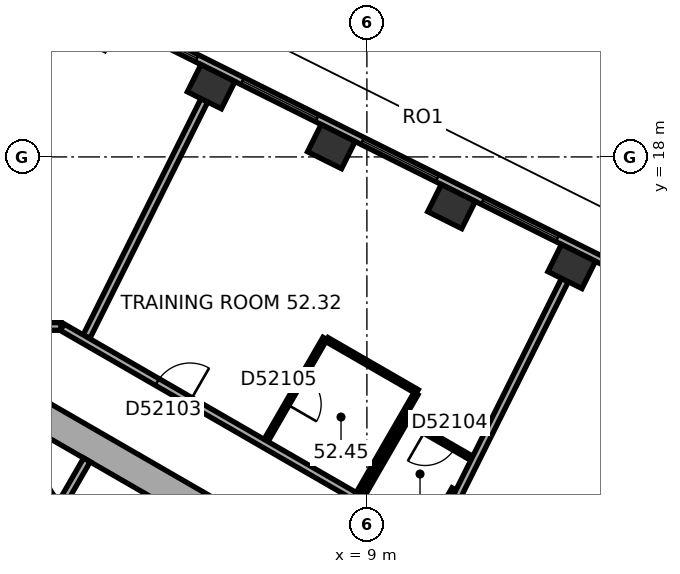
"""IFC4 building model, lengths in metres.
Left out: names, types, materials, properties, quantities, classifications, styles, units other than length and angle.
Written with IfcOpenShell. Run it as: python <this file> out.ifc"""

import sys

from ifc_helpers import new_model, si_unit, direction, frame, frame_2d, origin, origin_2d, place, context, subcontext, project, spatial, rectangle, extrude, element, fill, save


model = new_model("IFC4")
c1 = context("Model", 3, precision=1e-05, world=origin(), true_north=direction((0.0, 1.0)))
c2 = subcontext(c1, "Body", "Model", "MODEL_VIEW")
j1 = project(units=[si_unit("LENGTHUNIT", "METRE"), si_unit("PLANEANGLEUNIT", "RADIAN")], contexts=[c1])
p1 = place(None, origin())
s1 = spatial("IfcSite", under=j1, at=p1, CompositionType="ELEMENT")
p2 = place(p1, origin())
s2 = spatial("IfcBuilding", under=s1, at=p2, CompositionType="ELEMENT")
p3 = place(p2, frame((0.0, 0.0, 210.6)))
s3 = spatial("IfcBuildingStorey", under=s2, at=p3, CompositionType="ELEMENT", Elevation=210.6)
for number, where, z_axis, x_axis in (
    (1, (14.389, 15.118, 0.0), (0.0, 0.0, 1.0), (-0.895, 0.446, 0.0)),
    (2, (11.227, 16.695, 0.0), (0.0, 0.0, 1.0), (-0.895, 0.446, 0.0)),
    (3, (8.064, 18.271, 0.0), (0.0, 0.0, 1.0), (-0.895, 0.446, 0.0)),
    (4, (4.902, 19.848, 0.0), (0.0, 0.0, 1.0), (-0.895, 0.446, 0.0)),
):
    element("IfcColumn", number, at=place(p3, frame(where, z_axis=z_axis, x_axis=x_axis)), inside=s3, PredefinedType="COLUMN", context=c2, shape_type="SweptSolid", body=[
        extrude(rectangle(XDim=1.0, YDim=0.8, at=origin_2d()), origin(), (0.0, 0.0, 1.0), 3.7),
    ])
p4 = place(p3, frame((10.1, 5.6, 0.0), z_axis=(0.0, 0.0, 1.0), x_axis=(-0.866023897231, 0.500002609418, 0.0)))
e5 = element("IfcWall", 5, at=p4, inside=s3, PredefinedType="SHEAR", context=c2, shape_type="SweptSolid", body=[
    extrude(rectangle(XDim=11.894, YDim=0.8, at=frame_2d((5.947, 0.0))), origin(), (0.0, 0.0, 1.0), 3.7),
])
p5 = place(p4, frame((5.197, 0.0, 0.0)))
e6 = element("IfcOpeningElement", 6, at=p5, cuts=e5, PredefinedType="OPENING", context=c2, shape_type="SweptSolid", body=[
    extrude(rectangle(XDim=0.9, YDim=2.1, at=frame_2d((0.45, 1.05))), frame((0.0, 0.41, 0.0), z_axis=(0.0, -1.0, 0.0), x_axis=(1.0, 0.0, 0.0)), (0.0, 0.0, 1.0), 0.82),
])
p6 = place(p3, frame((18.299, 13.727, 0.0), z_axis=(0.0, 0.0, 1.0), x_axis=(-0.894934554817, 0.44619742558, 0.0)))
e7 = element("IfcWall", 7, at=p6, inside=s3, PredefinedType="STANDARD", context=c2, shape_type="SweptSolid", body=[
    extrude(rectangle(XDim=18.841, YDim=0.2, at=frame_2d((9.421, 0.0))), origin(), (0.0, 0.0, 1.0), 3.7),
])
p7 = place(p6, frame((1.253, 0.0, 0.9)))
e8 = element("IfcOpeningElement", 8, at=p7, cuts=e7, PredefinedType="OPENING", context=c2, shape_type="SweptSolid", body=[
    extrude(rectangle(XDim=2.2, YDim=2.0, at=frame_2d((1.1, 1.0))), frame((0.0, 0.11, 0.0), z_axis=(0.0, -1.0, 0.0), x_axis=(1.0, 0.0, 0.0)), (0.0, 0.0, 1.0), 0.22),
])
p8 = place(p6, frame((4.786, 0.0, 0.9)))
e9 = element("IfcOpeningElement", 9, at=p8, cuts=e7, PredefinedType="OPENING", context=c2, shape_type="SweptSolid", body=[
    extrude(rectangle(XDim=2.2, YDim=2.0, at=frame_2d((1.1, 1.0))), frame((0.0, 0.11, 0.0), z_axis=(0.0, -1.0, 0.0), x_axis=(1.0, 0.0, 0.0)), (0.0, 0.0, 1.0), 0.22),
])
p9 = place(p6, frame((8.32, 0.0, 0.9)))
e10 = element("IfcOpeningElement", 10, at=p9, cuts=e7, PredefinedType="OPENING", context=c2, shape_type="SweptSolid", body=[
    extrude(rectangle(XDim=2.2, YDim=2.0, at=frame_2d((1.1, 1.0))), frame((0.0, 0.11, 0.0), z_axis=(0.0, -1.0, 0.0), x_axis=(1.0, 0.0, 0.0)), (0.0, 0.0, 1.0), 0.22),
])
p10 = place(p6, frame((11.854, 0.0, 0.9)))
e11 = element("IfcOpeningElement", 11, at=p10, cuts=e7, PredefinedType="OPENING", context=c2, shape_type="SweptSolid", body=[
    extrude(rectangle(XDim=2.2, YDim=2.0, at=frame_2d((1.1, 1.0))), frame((0.0, 0.11, 0.0), z_axis=(0.0, -1.0, 0.0), x_axis=(1.0, 0.0, 0.0)), (0.0, 0.0, 1.0), 0.22),
])
p11 = place(p6, frame((15.387, 0.0, 0.9)))
e12 = element("IfcOpeningElement", 12, at=p11, cuts=e7, PredefinedType="OPENING", context=c2, shape_type="SweptSolid", body=[
    extrude(rectangle(XDim=2.2, YDim=2.0, at=frame_2d((1.1, 1.0))), frame((0.0, 0.11, 0.0), z_axis=(0.0, -1.0, 0.0), x_axis=(1.0, 0.0, 0.0)), (0.0, 0.0, 1.0), 0.22),
])
p12 = place(p3, frame((0.532, 8.122, 0.0), z_axis=(0.0, 0.0, 1.0), x_axis=(0.500077893725, 0.86598042715, 0.0)))
e13 = element("IfcWall", 13, at=p12, inside=s3, PredefinedType="PARTITIONING", context=c2, shape_type="SweptSolid", body=[
    extrude(rectangle(XDim=2.2, YDim=0.2, at=frame_2d((1.1, 0.0))), origin(), (0.0, 0.0, 1.0), 3.35),
])
p13 = place(p3, frame((0.767, 8.872, 0.0), z_axis=(0.0, 0.0, 1.0), x_axis=(-0.499994660107, 0.866028486751, 0.0)))
e14 = element("IfcWall", 14, at=p13, inside=s3, PredefinedType="PARTITIONING", context=c2, shape_type="SweptSolid", body=[
    extrude(rectangle(XDim=2.2, YDim=0.2, at=frame_2d((1.1, 0.0))), origin(), (0.0, 0.0, 1.0), 3.35),
])
p14 = place(p3, frame((0.95, 13.539, 0.0), z_axis=(0.0, 0.0, 1.0), x_axis=(-1.0, 0.0, 0.0)))
e15 = element("IfcWall", 15, at=p14, inside=s3, PredefinedType="PARTITIONING", context=c2, shape_type="SweptSolid", body=[
    extrude(rectangle(XDim=1.9, YDim=0.2, at=frame_2d((0.95, 0.0))), origin(), (0.0, 0.0, 1.0), 3.35),
])
p15 = place(p3, frame((4.723, 19.49, 0.0), z_axis=(0.0, 0.0, 1.0), x_axis=(-0.446186614574, -0.894939944898, 0.0)))
e16 = element("IfcWall", 16, at=p15, inside=s3, PredefinedType="PARTITIONING", context=c2, shape_type="SweptSolid", body=[
    extrude(rectangle(XDim=6.944, YDim=0.2, at=frame_2d((3.472, 0.0))), origin(), (0.0, 0.0, 1.0), 2.65),
])
p16 = place(p3, frame((6.347, 10.539, 0.0), z_axis=(0.0, 0.0, 1.0), x_axis=(0.499933790963, 0.866063626216, 0.0)))
e17 = element("IfcWall", 17, at=p16, inside=s3, PredefinedType="PARTITIONING", context=c2, shape_type="SweptSolid", body=[
    extrude(rectangle(XDim=3.1, YDim=0.12, at=frame_2d((1.55, 0.0))), origin(), (0.0, 0.0, 1.0), 3.35),
])
p17 = place(p16, frame((1.1, 0.0, 0.0)))
e18 = element("IfcOpeningElement", 18, at=p17, cuts=e17, PredefinedType="OPENING", context=c2, shape_type="SweptSolid", body=[
    extrude(rectangle(XDim=0.9, YDim=2.1, at=frame_2d((0.45, 1.05))), frame((0.0, 0.07, 0.0), z_axis=(0.0, -1.0, 0.0), x_axis=(1.0, 0.0, 0.0)), (0.0, 0.0, 1.0), 0.14),
])
p18 = place(p3, frame((7.948, 13.193, 0.0), z_axis=(0.0, 0.0, 1.0), x_axis=(0.866019409031, -0.500010383074, 0.0)))
e19 = element("IfcWall", 19, at=p18, inside=s3, PredefinedType="PARTITIONING", context=c2, shape_type="SweptSolid", body=[
    extrude(rectangle(XDim=2.74, YDim=0.12, at=frame_2d((1.37, 0.0))), origin(), (0.0, 0.0, 1.0), 3.35),
])
p19 = place(p3, frame((8.721, 9.052, 0.0), z_axis=(0.0, 0.0, 1.0), x_axis=(-0.866028125821, 0.499995285264, 0.0)))
e20 = element("IfcWall", 20, at=p19, inside=s3, PredefinedType="PARTITIONING", context=c2, shape_type="SweptSolid", body=[
    extrude(rectangle(XDim=8.934, YDim=0.2, at=frame_2d((4.467, 0.0))), origin(), (0.0, 0.0, 1.0), 3.35),
])
p20 = place(p19, frame((5.05, 0.0, 0.0)))
e21 = element("IfcOpeningElement", 21, at=p20, cuts=e20, PredefinedType="OPENING", context=c2, shape_type="SweptSolid", body=[
    extrude(rectangle(XDim=1.0, YDim=2.1, at=frame_2d((0.5, 1.05))), frame((0.0, 0.11, 0.0), z_axis=(0.0, -1.0, 0.0), x_axis=(1.0, 0.0, 0.0)), (0.0, 0.0, 1.0), 0.22),
])
p21 = place(p3, frame((8.875, 9.079, 0.0), z_axis=(0.0, 0.0, 1.0), x_axis=(0.499998129301, 0.86602648383, 0.0)))
e22 = element("IfcWall", 22, at=p21, inside=s3, PredefinedType="PARTITIONING", context=c2, shape_type="SweptSolid", body=[
    extrude(rectangle(XDim=2.3, YDim=0.12, at=frame_2d((1.15, 0.0))), origin(), (0.0, 0.0, 1.0), 3.35),
])
p22 = place(p3, frame((10.077, 11.04, 0.0), z_axis=(0.0, 0.0, 1.0), x_axis=(0.866043088465, -0.499969367985, 0.0)))
e23 = element("IfcWall", 23, at=p22, inside=s3, PredefinedType="PARTITIONING", context=c2, shape_type="SweptSolid", body=[
    extrude(rectangle(XDim=1.94, YDim=0.12, at=frame_2d((0.97, 0.0))), origin(), (0.0, 0.0, 1.0), 3.35),
])
p23 = place(p22, frame((0.52, 0.0, 0.0)))
e24 = element("IfcOpeningElement", 24, at=p23, cuts=e23, PredefinedType="OPENING", context=c2, shape_type="SweptSolid", body=[
    extrude(rectangle(XDim=0.9, YDim=2.1, at=frame_2d((0.45, 1.05))), frame((0.0, 0.07, 0.0), z_axis=(0.0, -1.0, 0.0), x_axis=(1.0, 0.0, 0.0)), (0.0, 0.0, 1.0), 0.14),
])
p24 = place(p3, frame((10.292, 11.771, 0.0), z_axis=(0.0, 0.0, 1.0), x_axis=(-0.500026023896, -0.86601037836, 0.0)))
e25 = element("IfcWall", 25, at=p24, inside=s3, PredefinedType="PARTITIONING", context=c2, shape_type="SweptSolid", body=[
    extrude(rectangle(XDim=3.04, YDim=0.12, at=frame_2d((1.52, 0.0))), origin(), (0.0, 0.0, 1.0), 3.35),
])
p25 = place(p3, frame((11.291, 9.263, 0.0), z_axis=(0.0, 0.0, 1.0), x_axis=(-0.500036664704, -0.866004234373, 0.0)))
e26 = element("IfcWall", 26, at=p25, inside=s3, PredefinedType="PARTITIONING", context=c2, shape_type="SweptSolid", body=[
    extrude(rectangle(XDim=1.368, YDim=0.12, at=frame_2d((0.684, 0.0))), origin(), (0.0, 0.0, 1.0), 3.35),
])
p26 = place(p3, frame((14.211, 14.76, 0.0), z_axis=(0.0, 0.0, 1.0), x_axis=(-0.446198490295, -0.89493402397, 0.0)))
e27 = element("IfcWall", 27, at=p26, inside=s3, PredefinedType="PARTITIONING", context=c2, shape_type="SweptSolid", body=[
    extrude(rectangle(XDim=7.602, YDim=0.2, at=frame_2d((3.801, 0.0))), origin(), (0.0, 0.0, 1.0), 3.35),
])
p27 = place(p8, origin())
e28 = element("IfcWindow", 28, at=p27, inside=s3, PartitioningType="SINGLE_PANEL", PredefinedType="WINDOW", context=c2, shape_type="SweptSolid", body=[
    extrude(rectangle(XDim=2.2, YDim=2.0, at=frame_2d((1.1, 1.0))), frame((0.0, 0.03, 0.0), z_axis=(0.0, -1.0, 0.0), x_axis=(1.0, 0.0, 0.0)), (0.0, 0.0, 1.0), 0.06),
])
fill(e9, e28)
p28 = place(p9, origin())
e29 = element("IfcWindow", 29, at=p28, inside=s3, PartitioningType="SINGLE_PANEL", PredefinedType="WINDOW", context=c2, shape_type="SweptSolid", body=[
    extrude(rectangle(XDim=2.2, YDim=2.0, at=frame_2d((1.1, 1.0))), frame((0.0, 0.03, 0.0), z_axis=(0.0, -1.0, 0.0), x_axis=(1.0, 0.0, 0.0)), (0.0, 0.0, 1.0), 0.06),
])
fill(e10, e29)
p29 = place(p10, origin())
e30 = element("IfcWindow", 30, at=p29, inside=s3, PartitioningType="SINGLE_PANEL", PredefinedType="WINDOW", context=c2, shape_type="SweptSolid", body=[
    extrude(rectangle(XDim=2.2, YDim=2.0, at=frame_2d((1.1, 1.0))), frame((0.0, 0.03, 0.0), z_axis=(0.0, -1.0, 0.0), x_axis=(1.0, 0.0, 0.0)), (0.0, 0.0, 1.0), 0.06),
])
fill(e11, e30)
p30 = place(p11, origin())
e31 = element("IfcWindow", 31, at=p30, inside=s3, PartitioningType="SINGLE_PANEL", PredefinedType="WINDOW", context=c2, shape_type="SweptSolid", body=[
    extrude(rectangle(XDim=2.2, YDim=2.0, at=frame_2d((1.1, 1.0))), frame((0.0, 0.03, 0.0), z_axis=(0.0, -1.0, 0.0), x_axis=(1.0, 0.0, 0.0)), (0.0, 0.0, 1.0), 0.06),
])
fill(e12, e31)
p31 = place(p20, origin())
e32 = element("IfcDoor", 32, at=p31, inside=s3, OperationType="SINGLE_SWING_LEFT", PredefinedType="DOOR", context=c2, shape_type="SweptSolid", body=[
    extrude(rectangle(XDim=1.0, YDim=2.1, at=frame_2d((0.5, 1.05))), frame((0.0, 0.025, 0.0), z_axis=(0.0, -1.0, 0.0), x_axis=(1.0, 0.0, 0.0)), (0.0, 0.0, 1.0), 0.05),
])
fill(e21, e32)
p32 = place(p23, origin())
e33 = element("IfcDoor", 33, at=p32, inside=s3, OperationType="SINGLE_SWING_LEFT", PredefinedType="DOOR", context=c2, shape_type="SweptSolid", body=[
    extrude(rectangle(XDim=0.9, YDim=2.1, at=frame_2d((0.45, 1.05))), frame((0.0, 0.025, 0.0), z_axis=(0.0, -1.0, 0.0), x_axis=(1.0, 0.0, 0.0)), (0.0, 0.0, 1.0), 0.05),
])
fill(e24, e33)
p33 = place(p17, origin())
e34 = element("IfcDoor", 34, at=p33, inside=s3, OperationType="SINGLE_SWING_LEFT", PredefinedType="DOOR", context=c2, shape_type="SweptSolid", body=[
    extrude(rectangle(XDim=0.9, YDim=2.1, at=frame_2d((0.45, 1.05))), frame((0.0, 0.025, 0.0), z_axis=(0.0, -1.0, 0.0), x_axis=(1.0, 0.0, 0.0)), (0.0, 0.0, 1.0), 0.05),
])
fill(e18, e34)
save(model, sys.argv[1])
